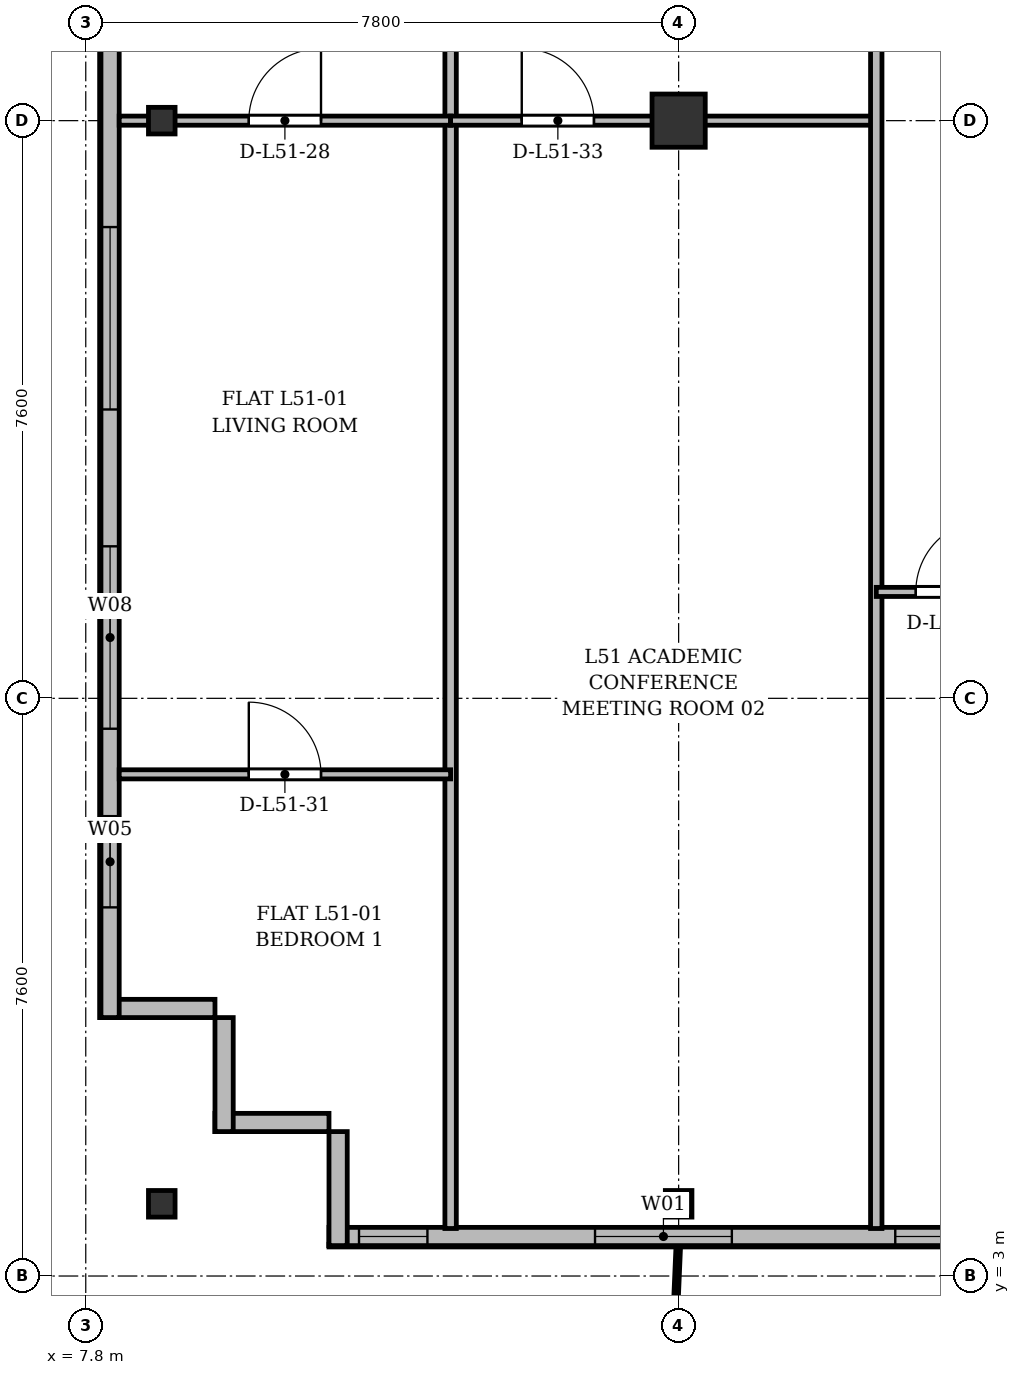
"""IFC4 building model, lengths in metres.
Left out: names, types, materials, properties, quantities, classifications, styles, units other than length and angle.
Written with IfcOpenShell. Run it as: python <this file> out.ifc"""

import sys

from ifc_helpers import new_model, si_unit, direction, frame, frame_2d, origin, origin_2d, place, context, subcontext, project, spatial, rectangle, i_section, extrude, source, transform, mapped, element, fill, save


model = new_model("IFC4")
c1 = context("Model", 3, precision=1e-05, world=origin(), true_north=direction((0.0, 1.0)))
c2 = subcontext(c1, "Body", "Model", "MODEL_VIEW")
j1 = project(units=[si_unit("LENGTHUNIT", "METRE"), si_unit("PLANEANGLEUNIT", "RADIAN")], contexts=[c1])
p1 = place(None, origin())
s1 = spatial("IfcSite", under=j1, at=p1, CompositionType="ELEMENT")
p2 = place(p1, origin())
s2 = spatial("IfcBuilding", under=s1, at=p2, CompositionType="ELEMENT")
p3 = place(p2, frame((0.0, 0.0, 197.7)))
s3 = spatial("IfcBuildingStorey", under=s2, at=p3, CompositionType="ELEMENT", Elevation=197.7)
m1 = source(origin(), c2, "Body", "SweptSolid", [
    extrude(i_section(OverallWidth=0.35, OverallDepth=0.35, WebThickness=0.018, FlangeThickness=0.028, at=origin_2d()), origin(), (0.0, 0.0, 1.0), 3.6),
])
for number, where, z_axis, x_axis in (
    (1, (8.8, 3.95, 0.0), (0.0, 0.0, 1.0), (1.0, 0.0, 0.0)),
    (2, (8.8, 18.2, 0.0), (0.0, 0.0, 1.0), (1.0, 0.0, 0.0)),
    (3, (15.6, 3.95, 0.0), (0.0, 0.0, 1.0), (1.0, 0.0, 0.0)),
):
    element("IfcColumn", number, at=place(p3, frame(where, z_axis=z_axis, x_axis=x_axis)), inside=s3, PredefinedType="COLUMN", context=c2, shape_type="MappedRepresentation", body=[
        mapped(m1, transform((0.0, 0.0, 0.0), x_axis=(1.0, 0.0, 0.0), y_axis=(0.0, 1.0, 0.0), z_axis=(0.0, 0.0, 1.0), scale=1.0)),
    ])
m2 = source(origin(), c2, "Body", "SweptSolid", [
    extrude(rectangle(XDim=0.7, YDim=0.7, at=origin_2d()), origin(), (0.0, 0.0, 1.0), 3.6),
])
p4 = place(p3, frame((15.6, 18.2, 0.0), z_axis=(0.0, 0.0, 1.0), x_axis=(1.0, 0.0, 0.0)))
e4 = element("IfcColumn", 4, at=p4, inside=s3, PredefinedType="COLUMN", context=c2, shape_type="MappedRepresentation", body=[
    mapped(m2, transform((0.0, 0.0, 0.0), x_axis=(1.0, 0.0, 0.0), y_axis=(0.0, 1.0, 0.0), z_axis=(0.0, 0.0, 1.0), scale=1.0)),
])
for number, where, z_axis, x_axis in (
    (5, (11.0, 5.02, 0.0), (0.0, 0.0, 1.0), (-1.0, 0.0, 0.0)),
    (6, (9.62, 4.9, 0.0), (0.0, 0.0, 1.0), (0.0, 1.0, 0.0)),
):
    element("IfcWall", number, at=place(p3, frame(where, z_axis=z_axis, x_axis=x_axis)), inside=s3, PredefinedType="SOLIDWALL", context=c2, shape_type="SweptSolid", body=[
        extrude(rectangle(XDim=1.5, YDim=0.24, at=frame_2d((0.75, 0.0))), origin(), (0.0, 0.0, 1.0), 3.36),
    ])
p5 = place(p3, frame((9.5, 6.52, 0.0), z_axis=(0.0, 0.0, 1.0), x_axis=(-1.0, 0.0, 0.0)))
e7 = element("IfcWall", 7, at=p5, inside=s3, PredefinedType="SOLIDWALL", context=c2, shape_type="SweptSolid", body=[
    extrude(rectangle(XDim=1.5, YDim=0.24, at=frame_2d((0.75, 0.0))), origin(), (0.0, 0.0, 1.0), 2.86),
])
p6 = place(p3, frame((8.12, 6.4, 0.0), z_axis=(0.0, 0.0, 1.0), x_axis=(0.0, 1.0, 0.0)))
e8 = element("IfcWall", 8, at=p6, inside=s3, PredefinedType="SOLIDWALL", context=c2, shape_type="SweptSolid", body=[
    extrude(rectangle(XDim=39.1, YDim=0.24, at=frame_2d((19.55, 0.0))), origin(), (0.0, 0.0, 1.0), 3.36),
])
p7 = place(p6, frame((1.45, 0.0, 0.92)))
e9 = element("IfcOpeningElement", 9, at=p7, cuts=e8, PredefinedType="OPENING", context=c2, shape_type="SweptSolid", body=[
    extrude(rectangle(XDim=1.2, YDim=1.65, at=frame_2d((0.6, 0.825))), frame((0.0, 0.13, 0.0), z_axis=(0.0, -1.0, 0.0), x_axis=(1.0, 0.0, 0.0)), (0.0, 0.0, 1.0), 0.26),
])
p8 = place(p6, frame((3.8, 0.0, 0.92)))
e10 = element("IfcOpeningElement", 10, at=p8, cuts=e8, PredefinedType="OPENING", context=c2, shape_type="SweptSolid", body=[
    extrude(rectangle(XDim=2.4, YDim=2.1, at=frame_2d((1.2, 1.05))), frame((0.0, 0.13, 0.0), z_axis=(0.0, -1.0, 0.0), x_axis=(1.0, 0.0, 0.0)), (0.0, 0.0, 1.0), 0.26),
])
p9 = place(p6, frame((8.0, 0.0, 0.92)))
e11 = element("IfcOpeningElement", 11, at=p9, cuts=e8, PredefinedType="OPENING", context=c2, shape_type="SweptSolid", body=[
    extrude(rectangle(XDim=2.4, YDim=2.1, at=frame_2d((1.2, 1.05))), frame((0.0, 0.13, 0.0), z_axis=(0.0, -1.0, 0.0), x_axis=(1.0, 0.0, 0.0)), (0.0, 0.0, 1.0), 0.26),
])
p10 = place(p6, frame((15.2, 0.0, 0.92)))
e12 = element("IfcOpeningElement", 12, at=p10, cuts=e8, PredefinedType="OPENING", context=c2, shape_type="SweptSolid", body=[
    extrude(rectangle(XDim=2.4, YDim=2.1, at=frame_2d((1.2, 1.05))), frame((0.0, 0.13, 0.0), z_axis=(0.0, -1.0, 0.0), x_axis=(1.0, 0.0, 0.0)), (0.0, 0.0, 1.0), 0.26),
])
p11 = place(p6, frame((33.4, 0.0, 0.92)))
e13 = element("IfcOpeningElement", 13, at=p11, cuts=e8, PredefinedType="OPENING", context=c2, shape_type="SweptSolid", body=[
    extrude(rectangle(XDim=1.2, YDim=1.65, at=frame_2d((0.6, 0.825))), frame((0.0, 0.13, 0.0), z_axis=(0.0, -1.0, 0.0), x_axis=(1.0, 0.0, 0.0)), (0.0, 0.0, 1.0), 0.26),
])
p12 = place(p6, frame((36.75, 0.0, 0.92)))
e14 = element("IfcOpeningElement", 14, at=p12, cuts=e8, PredefinedType="OPENING", context=c2, shape_type="SweptSolid", body=[
    extrude(rectangle(XDim=1.2, YDim=1.65, at=frame_2d((0.6, 0.825))), frame((0.0, 0.13, 0.0), z_axis=(0.0, -1.0, 0.0), x_axis=(1.0, 0.0, 0.0)), (0.0, 0.0, 1.0), 0.26),
])
p13 = place(p3, frame((30.6, 3.52, 0.0), z_axis=(0.0, 0.0, 1.0), x_axis=(-1.0, 0.0, 0.0)))
e15 = element("IfcWall", 15, at=p13, inside=s3, PredefinedType="SOLIDWALL", context=c2, shape_type="SweptSolid", body=[
    extrude(rectangle(XDim=19.6, YDim=0.24, at=frame_2d((9.8, 0.0))), origin(), (0.0, 0.0, 1.0), 3.36),
])
p14 = place(p13, frame((1.345, 0.0, 0.9)))
e16 = element("IfcOpeningElement", 16, at=p14, cuts=e15, PredefinedType="OPENING", context=c2, shape_type="SweptSolid", body=[
    extrude(rectangle(XDim=2.2, YDim=1.8, at=frame_2d((1.1, 0.9))), frame((0.0, 0.13, 0.0), z_axis=(0.0, -1.0, 0.0), x_axis=(1.0, 0.0, 0.0)), (0.0, 0.0, 1.0), 0.26),
])
p15 = place(p13, frame((5.45, 0.0, 0.9)))
e17 = element("IfcOpeningElement", 17, at=p15, cuts=e15, PredefinedType="OPENING", context=c2, shape_type="SweptSolid", body=[
    extrude(rectangle(XDim=1.5, YDim=1.75, at=frame_2d((0.75, 0.875))), frame((0.0, 0.13, 0.0), z_axis=(0.0, -1.0, 0.0), x_axis=(1.0, 0.0, 0.0)), (0.0, 0.0, 1.0), 0.26),
])
p16 = place(p13, frame((8.0, 0.0, 0.9)))
e18 = element("IfcOpeningElement", 18, at=p16, cuts=e15, PredefinedType="OPENING", context=c2, shape_type="SweptSolid", body=[
    extrude(rectangle(XDim=2.0, YDim=1.95, at=frame_2d((1.0, 0.975))), frame((0.0, 0.13, 0.0), z_axis=(0.0, -1.0, 0.0), x_axis=(1.0, 0.0, 0.0)), (0.0, 0.0, 1.0), 0.26),
])
p17 = place(p13, frame((10.65, 0.0, 0.9)))
e19 = element("IfcOpeningElement", 19, at=p17, cuts=e15, PredefinedType="OPENING", context=c2, shape_type="SweptSolid", body=[
    extrude(rectangle(XDim=1.5, YDim=1.75, at=frame_2d((0.75, 0.875))), frame((0.0, 0.13, 0.0), z_axis=(0.0, -1.0, 0.0), x_axis=(1.0, 0.0, 0.0)), (0.0, 0.0, 1.0), 0.26),
])
p18 = place(p13, frame((14.3, 0.0, 0.9)))
e20 = element("IfcOpeningElement", 20, at=p18, cuts=e15, PredefinedType="OPENING", context=c2, shape_type="SweptSolid", body=[
    extrude(rectangle(XDim=1.8, YDim=1.8, at=frame_2d((0.9, 0.9))), frame((0.0, 0.13, 0.0), z_axis=(0.0, -1.0, 0.0), x_axis=(1.0, 0.0, 0.0)), (0.0, 0.0, 1.0), 0.26),
])
p19 = place(p13, frame((18.305, 0.0, 0.9)))
e21 = element("IfcOpeningElement", 21, at=p19, cuts=e15, PredefinedType="OPENING", context=c2, shape_type="SweptSolid", body=[
    extrude(rectangle(XDim=0.9, YDim=1.65, at=frame_2d((0.45, 0.825))), frame((0.0, 0.13, 0.0), z_axis=(0.0, -1.0, 0.0), x_axis=(1.0, 0.0, 0.0)), (0.0, 0.0, 1.0), 0.26),
])
p20 = place(p3, frame((11.12, 3.4, 0.0), z_axis=(0.0, 0.0, 1.0), x_axis=(0.0, 1.0, 0.0)))
e22 = element("IfcWall", 22, at=p20, inside=s3, PredefinedType="SOLIDWALL", context=c2, shape_type="SweptSolid", body=[
    extrude(rectangle(XDim=1.5, YDim=0.24, at=frame_2d((0.75, 0.0))), origin(), (0.0, 0.0, 1.0), 2.91),
])
p21 = place(p3, frame((12.6, 3.625, 0.0), z_axis=(0.0, 0.0, 1.0), x_axis=(0.0, 1.0, 0.0)))
e23 = element("IfcWall", 23, at=p21, inside=s3, PredefinedType="PARTITIONING", context=c2, shape_type="SweptSolid", body=[
    extrude(rectangle(XDim=27.175, YDim=0.15, at=frame_2d((13.587, 0.0))), origin(), (0.0, 0.0, 1.0), 2.91),
])
p22 = place(p3, frame((8.24, 18.2, 0.0), z_axis=(0.0, 0.0, 1.0), x_axis=(1.0, 0.0, 0.0)))
e24 = element("IfcWall", 24, at=p22, inside=s3, PredefinedType="PARTITIONING", context=c2, shape_type="SweptSolid", body=[
    extrude(rectangle(XDim=4.36, YDim=0.12, at=frame_2d((2.18, 0.0))), origin(), (0.0, 0.0, 1.0), 2.91),
])
p23 = place(p22, frame((1.705, 0.0, 0.0)))
e25 = element("IfcOpeningElement", 25, at=p23, cuts=e24, PredefinedType="OPENING", context=c2, shape_type="SweptSolid", body=[
    extrude(rectangle(XDim=0.95, YDim=2.15, at=frame_2d((0.475, 1.075))), frame((0.0, 0.07, 0.0), z_axis=(0.0, -1.0, 0.0), x_axis=(1.0, 0.0, 0.0)), (0.0, 0.0, 1.0), 0.14),
])
p24 = place(p3, frame((8.24, 9.6, 0.0), z_axis=(0.0, 0.0, 1.0), x_axis=(1.0, 0.0, 0.0)))
e26 = element("IfcWall", 26, at=p24, inside=s3, PredefinedType="PARTITIONING", context=c2, shape_type="SweptSolid", body=[
    extrude(rectangle(XDim=4.36, YDim=0.12, at=frame_2d((2.18, 0.0))), origin(), (0.0, 0.0, 1.0), 2.86),
])
p25 = place(p24, frame((1.705, 0.0, 0.0)))
e27 = element("IfcOpeningElement", 27, at=p25, cuts=e26, PredefinedType="OPENING", context=c2, shape_type="SweptSolid", body=[
    extrude(rectangle(XDim=0.95, YDim=2.15, at=frame_2d((0.475, 1.075))), frame((0.0, 0.07, 0.0), z_axis=(0.0, -1.0, 0.0), x_axis=(1.0, 0.0, 0.0)), (0.0, 0.0, 1.0), 0.14),
])
p26 = place(p3, frame((12.6, 18.2, 0.0), z_axis=(0.0, 0.0, 1.0), x_axis=(1.0, 0.0, 0.0)))
e28 = element("IfcWall", 28, at=p26, inside=s3, PredefinedType="PARTITIONING", context=c2, shape_type="SweptSolid", body=[
    extrude(rectangle(XDim=5.6, YDim=0.12, at=frame_2d((2.8, 0.0))), origin(), (0.0, 0.0, 1.0), 2.91),
])
p27 = place(p26, frame((0.936, 0.0, 0.0)))
e29 = element("IfcOpeningElement", 29, at=p27, cuts=e28, PredefinedType="OPENING", context=c2, shape_type="SweptSolid", body=[
    extrude(rectangle(XDim=0.95, YDim=2.15, at=frame_2d((0.475, 1.075))), frame((0.0, 0.07, 0.0), z_axis=(0.0, -1.0, 0.0), x_axis=(1.0, 0.0, 0.0)), (0.0, 0.0, 1.0), 0.14),
])
p28 = place(p3, frame((18.2, 3.625, 0.0), z_axis=(0.0, 0.0, 1.0), x_axis=(0.0, 1.0, 0.0)))
e30 = element("IfcWall", 30, at=p28, inside=s3, PredefinedType="PARTITIONING", context=c2, shape_type="SweptSolid", body=[
    extrude(rectangle(XDim=27.175, YDim=0.15, at=frame_2d((13.587, 0.0))), origin(), (0.0, 0.0, 1.0), 2.91),
])
p29 = place(p3, frame((18.2, 12.0, 0.0), z_axis=(0.0, 0.0, 1.0), x_axis=(1.0, 0.0, 0.0)))
e31 = element("IfcWall", 31, at=p29, inside=s3, PredefinedType="PARTITIONING", context=c2, shape_type="SweptSolid", body=[
    extrude(rectangle(XDim=2.0, YDim=0.12, at=frame_2d((1.0, 0.0))), origin(), (0.0, 0.0, 1.0), 3.36),
])
p30 = place(p29, frame((0.52, 0.0, 0.0)))
e32 = element("IfcOpeningElement", 32, at=p30, cuts=e31, PredefinedType="OPENING", context=c2, shape_type="SweptSolid", body=[
    extrude(rectangle(XDim=0.95, YDim=2.15, at=frame_2d((0.475, 1.075))), frame((0.0, 0.07, 0.0), z_axis=(0.0, -1.0, 0.0), x_axis=(1.0, 0.0, 0.0)), (0.0, 0.0, 1.0), 0.14),
])
m3 = source(origin(), c2, "Body", "SweptSolid", [
    extrude(rectangle(XDim=1.2, YDim=1.65, at=frame_2d((0.6, 0.825))), frame((0.0, 0.03, 0.0), z_axis=(0.0, -1.0, 0.0), x_axis=(1.0, 0.0, 0.0)), (0.0, 0.0, 1.0), 0.06),
])
p31 = place(p7, origin())
e33 = element("IfcWindow", 33, at=p31, inside=s3, PartitioningType="SINGLE_PANEL", PredefinedType="WINDOW", context=c2, shape_type="MappedRepresentation", body=[
    mapped(m3, transform((0.0, 0.0, 0.0), x_axis=(1.0, 0.0, 0.0), y_axis=(0.0, 1.0, 0.0), z_axis=(0.0, 0.0, 1.0), scale=1.0)),
])
fill(e9, e33)
m4 = source(origin(), c2, "Body", "SweptSolid", [
    extrude(rectangle(XDim=2.4, YDim=2.1, at=frame_2d((1.2, 1.05))), frame((0.0, 0.03, 0.0), z_axis=(0.0, -1.0, 0.0), x_axis=(1.0, 0.0, 0.0)), (0.0, 0.0, 1.0), 0.06),
])
p32 = place(p8, origin())
e34 = element("IfcWindow", 34, at=p32, inside=s3, PartitioningType="SINGLE_PANEL", PredefinedType="WINDOW", context=c2, shape_type="MappedRepresentation", body=[
    mapped(m4, transform((0.0, 0.0, 0.0), x_axis=(1.0, 0.0, 0.0), y_axis=(0.0, 1.0, 0.0), z_axis=(0.0, 0.0, 1.0), scale=1.0)),
])
fill(e10, e34)
p33 = place(p9, origin())
e35 = element("IfcWindow", 35, at=p33, inside=s3, PartitioningType="SINGLE_PANEL", PredefinedType="WINDOW", context=c2, shape_type="MappedRepresentation", body=[
    mapped(m4, transform((0.0, 0.0, 0.0), x_axis=(1.0, 0.0, 0.0), y_axis=(0.0, 1.0, 0.0), z_axis=(0.0, 0.0, 1.0), scale=1.0)),
])
fill(e11, e35)
m5 = source(origin(), c2, "Body", "SweptSolid", [
    extrude(rectangle(XDim=1.5, YDim=1.75, at=frame_2d((0.75, 0.875))), frame((0.0, 0.03, 0.0), z_axis=(0.0, -1.0, 0.0), x_axis=(1.0, 0.0, 0.0)), (0.0, 0.0, 1.0), 0.06),
])
p34 = place(p17, origin())
e36 = element("IfcWindow", 36, at=p34, inside=s3, PartitioningType="SINGLE_PANEL", PredefinedType="WINDOW", context=c2, shape_type="MappedRepresentation", body=[
    mapped(m5, transform((0.0, 0.0, 0.0), x_axis=(1.0, 0.0, 0.0), y_axis=(0.0, 1.0, 0.0), z_axis=(0.0, 0.0, 1.0), scale=1.0)),
])
fill(e19, e36)
m6 = source(origin(), c2, "Body", "SweptSolid", [
    extrude(rectangle(XDim=1.8, YDim=1.8, at=frame_2d((0.9, 0.9))), frame((0.0, 0.03, 0.0), z_axis=(0.0, -1.0, 0.0), x_axis=(1.0, 0.0, 0.0)), (0.0, 0.0, 1.0), 0.06),
])
p35 = place(p18, origin())
e37 = element("IfcWindow", 37, at=p35, inside=s3, PartitioningType="SINGLE_PANEL", PredefinedType="WINDOW", context=c2, shape_type="MappedRepresentation", body=[
    mapped(m6, transform((0.0, 0.0, 0.0), x_axis=(1.0, 0.0, 0.0), y_axis=(0.0, 1.0, 0.0), z_axis=(0.0, 0.0, 1.0), scale=1.0)),
])
fill(e20, e37)
m7 = source(origin(), c2, "Body", "SweptSolid", [
    extrude(rectangle(XDim=0.9, YDim=1.65, at=frame_2d((0.45, 0.825))), frame((0.0, 0.03, 0.0), z_axis=(0.0, -1.0, 0.0), x_axis=(1.0, 0.0, 0.0)), (0.0, 0.0, 1.0), 0.06),
])
p36 = place(p19, origin())
e38 = element("IfcWindow", 38, at=p36, inside=s3, PartitioningType="SINGLE_PANEL", PredefinedType="WINDOW", context=c2, shape_type="MappedRepresentation", body=[
    mapped(m7, transform((0.0, 0.0, 0.0), x_axis=(1.0, 0.0, 0.0), y_axis=(0.0, 1.0, 0.0), z_axis=(0.0, 0.0, 1.0), scale=1.0)),
])
fill(e21, e38)
m8 = source(origin(), c2, "Body", "SweptSolid", [
    extrude(rectangle(XDim=0.95, YDim=2.15, at=frame_2d((0.475, 1.075))), frame((0.0, 0.025, 0.0), z_axis=(0.0, -1.0, 0.0), x_axis=(1.0, 0.0, 0.0)), (0.0, 0.0, 1.0), 0.05),
])
p37 = place(p23, origin())
e39 = element("IfcDoor", 39, at=p37, inside=s3, OperationType="SINGLE_SWING_RIGHT", PredefinedType="DOOR", context=c2, shape_type="MappedRepresentation", body=[
    mapped(m8, transform((0.0, 0.0, 0.0), x_axis=(1.0, 0.0, 0.0), y_axis=(0.0, 1.0, 0.0), z_axis=(0.0, 0.0, 1.0), scale=1.0)),
])
fill(e25, e39)
p38 = place(p25, origin())
e40 = element("IfcDoor", 40, at=p38, inside=s3, OperationType="SINGLE_SWING_LEFT", PredefinedType="DOOR", context=c2, shape_type="MappedRepresentation", body=[
    mapped(m8, transform((0.0, 0.0, 0.0), x_axis=(1.0, 0.0, 0.0), y_axis=(0.0, 1.0, 0.0), z_axis=(0.0, 0.0, 1.0), scale=1.0)),
])
fill(e27, e40)
p39 = place(p27, origin())
e41 = element("IfcDoor", 41, at=p39, inside=s3, OperationType="SINGLE_SWING_LEFT", PredefinedType="DOOR", context=c2, shape_type="MappedRepresentation", body=[
    mapped(m8, transform((0.0, 0.0, 0.0), x_axis=(1.0, 0.0, 0.0), y_axis=(0.0, 1.0, 0.0), z_axis=(0.0, 0.0, 1.0), scale=1.0)),
])
fill(e29, e41)
p40 = place(p30, origin())
e42 = element("IfcDoor", 42, at=p40, inside=s3, OperationType="SINGLE_SWING_RIGHT", PredefinedType="DOOR", context=c2, shape_type="MappedRepresentation", body=[
    mapped(m8, transform((0.0, 0.0, 0.0), x_axis=(1.0, 0.0, 0.0), y_axis=(0.0, 1.0, 0.0), z_axis=(0.0, 0.0, 1.0), scale=1.0)),
])
fill(e32, e42)
save(model, sys.argv[1])
